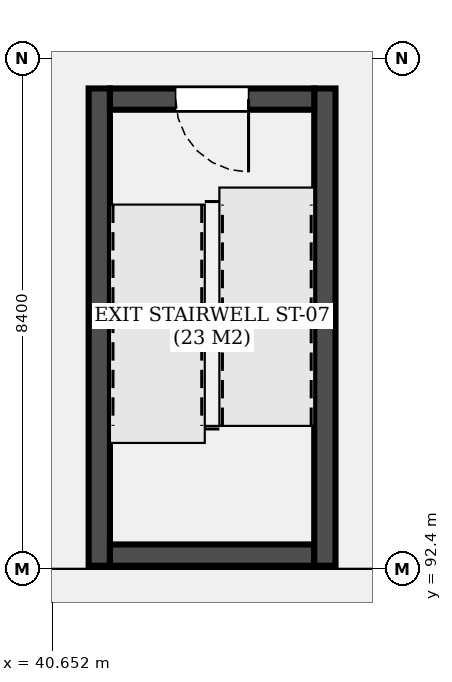
"""IFC4 building model, lengths in metres.
Left out: names, types, materials, properties, quantities, classifications, styles, units other than length and angle.
Written with IfcOpenShell. Run it as: python <this file> out.ifc"""

import sys

from ifc_helpers import new_model, si_unit, direction, frame, frame_2d, origin, place, context, subcontext, project, spatial, rectangle, extrude, element, fill, save


model = new_model("IFC4")
c1 = context("Model", 3, precision=1e-05, world=origin(), true_north=direction((0.0, 1.0)))
c2 = subcontext(c1, "Body", "Model", "MODEL_VIEW")
j1 = project(units=[si_unit("LENGTHUNIT", "METRE"), si_unit("PLANEANGLEUNIT", "RADIAN")], contexts=[c1])
p1 = place(None, origin())
s1 = spatial("IfcSite", under=j1, at=p1, CompositionType="ELEMENT")
p2 = place(p1, origin())
s2 = spatial("IfcBuilding", under=s1, at=p2, CompositionType="ELEMENT")
p3 = place(p2, origin())
s3 = spatial("IfcBuildingStorey", under=s2, at=p3, CompositionType="ELEMENT", Elevation=0.0)
p4 = place(p3, frame((41.425, 100.3, 0.0), z_axis=(0.0, 0.0, 1.0), x_axis=(0.0, -1.0, 0.0)))
e1 = element("IfcWall", 1, at=p4, inside=s3, PredefinedType="SHEAR", context=c2, shape_type="SweptSolid", body=[
    extrude(rectangle(XDim=7.85, YDim=0.35, at=frame_2d((3.925, 0.0))), origin(), (0.0, 0.0, 1.0), 5.1),
])
p5 = place(p3, frame((41.6, 92.625, 0.0), z_axis=(0.0, 0.0, 1.0), x_axis=(1.0, 0.0, 0.0)))
e2 = element("IfcWall", 2, at=p5, inside=s3, PredefinedType="SHEAR", context=c2, shape_type="SweptSolid", body=[
    extrude(rectangle(XDim=3.36, YDim=0.35, at=frame_2d((1.68, 0.0))), origin(), (0.0, 0.0, 1.0), 5.1),
])
p6 = place(p3, frame((45.135, 92.45, 0.0), z_axis=(0.0, 0.0, 1.0), x_axis=(0.0, 1.0, 0.0)))
e3 = element("IfcWall", 3, at=p6, inside=s3, PredefinedType="SHEAR", context=c2, shape_type="SweptSolid", body=[
    extrude(rectangle(XDim=7.85, YDim=0.35, at=frame_2d((3.925, 0.0))), origin(), (0.0, 0.0, 1.0), 5.1),
])
p7 = place(p3, frame((44.96, 100.125, 0.0), z_axis=(0.0, 0.0, 1.0), x_axis=(-1.0, 0.0, 0.0)))
e4 = element("IfcWall", 4, at=p7, inside=s3, PredefinedType="SHEAR", context=c2, shape_type="SweptSolid", body=[
    extrude(rectangle(XDim=3.36, YDim=0.35, at=frame_2d((1.68, 0.0))), origin(), (0.0, 0.0, 1.0), 5.1),
])
p8 = place(p7, frame((1.08, 0.0, 0.0)))
e5 = element("IfcOpeningElement", 5, at=p8, cuts=e4, PredefinedType="OPENING", context=c2, shape_type="SweptSolid", body=[
    extrude(rectangle(XDim=1.2, YDim=2.2, at=frame_2d((0.6, 1.1))), frame((0.0, 0.185, 0.0), z_axis=(0.0, -1.0, 0.0), x_axis=(1.0, 0.0, 0.0)), (0.0, 0.0, 1.0), 0.37),
])
p9 = place(p8, origin())
e6 = element("IfcDoor", 6, at=p9, inside=s3, OperationType="SINGLE_SWING_LEFT", PredefinedType="DOOR", context=c2, shape_type="SweptSolid", body=[
    extrude(rectangle(XDim=1.2, YDim=2.2, at=frame_2d((0.6, 1.1))), frame((0.0, 0.025, 0.0), z_axis=(0.0, -1.0, 0.0), x_axis=(1.0, 0.0, 0.0)), (0.0, 0.0, 1.0), 0.05),
])
fill(e5, e6)
save(model, sys.argv[1])
